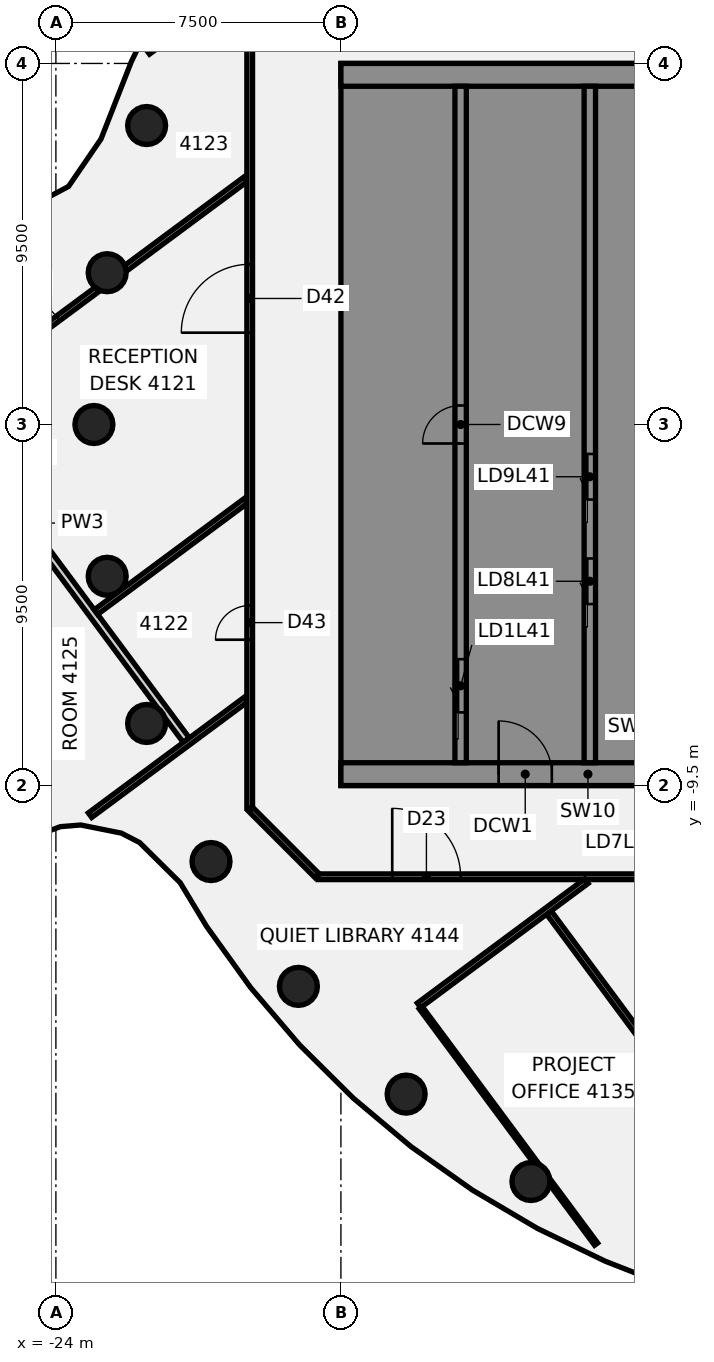
"""IFC4 building model, lengths in metres.
Left out: names, types, materials, properties, quantities, classifications, styles, units other than length and angle.
Written with IfcOpenShell. Run it as: python <this file> out.ifc"""

import sys

from ifc_helpers import new_model, si_unit, direction, frame, frame_2d, origin, origin_2d, place, context, subcontext, project, spatial, polyline, rectangle, circle, outline, extrude, element, fill, save


model = new_model("IFC4")
c1 = context("Model", 3, precision=1e-05, world=origin(), true_north=direction((0.0, 1.0)))
c2 = subcontext(c1, "Body", "Model", "MODEL_VIEW")
j1 = project(units=[si_unit("LENGTHUNIT", "METRE"), si_unit("PLANEANGLEUNIT", "RADIAN")], contexts=[c1])
p1 = place(None, origin())
s1 = spatial("IfcSite", under=j1, at=p1, CompositionType="ELEMENT")
p2 = place(p1, origin())
s2 = spatial("IfcBuilding", under=s1, at=p2, CompositionType="ELEMENT")
p3 = place(p2, frame((0.0, 0.0, 166.75)))
s3 = spatial("IfcBuildingStorey", under=s2, at=p3, CompositionType="ELEMENT", Elevation=166.75)
for number, where, z_axis, x_axis in (
    (1, (-21.613, 7.866, -0.14), (0.0, 0.0, 1.0), (1.0, 0.0, 0.0)),
    (2, (-22.651, 3.994, -0.14), (0.0, 0.0, 1.0), (1.0, 0.0, 0.0)),
    (3, (-23.0, 0.0, -0.14), (0.0, 0.0, 1.0), (1.0, 0.0, 0.0)),
    (4, (-22.651, -3.994, -0.14), (0.0, 0.0, 1.0), (1.0, 0.0, 0.0)),
    (5, (-21.613, -7.866, -0.14), (0.0, 0.0, 1.0), (1.0, 0.0, 0.0)),
    (6, (-19.919, -11.5, -0.14), (0.0, 0.0, 1.0), (1.0, 0.0, 0.0)),
    (7, (-17.619, -14.784, -0.14), (0.0, 0.0, 1.0), (1.0, 0.0, 0.0)),
    (8, (-14.784, -17.619, -0.14), (0.0, 0.0, 1.0), (1.0, 0.0, 0.0)),
    (9, (-11.5, -19.919, -0.14), (0.0, 0.0, 1.0), (1.0, 0.0, 0.0)),
):
    element("IfcColumn", number, at=place(p3, frame(where, z_axis=z_axis, x_axis=x_axis)), inside=s3, PredefinedType="COLUMN", context=c2, shape_type="SweptSolid", body=[
        extrude(circle(Radius=0.5, at=origin_2d()), origin(), (0.0, 0.0, 1.0), 3.75),
    ])
p4 = place(p3, frame((-29.043, 3.116, 0.0), z_axis=(0.0, 0.0, 1.0), x_axis=(0.595824418901, -0.803114725205, 0.0)))
e10 = element("IfcWall", 10, at=p4, inside=s3, PredefinedType="PARTITIONING", context=c2, shape_type="SweptSolid", body=[
    extrude(rectangle(XDim=14.219, YDim=0.2, at=frame_2d((7.11, 0.0))), origin(), (0.0, 0.0, 1.0), 3.01),
])
p5 = place(p4, frame((5.799, 0.0, 0.0)))
e11 = element("IfcOpeningElement", 11, at=p5, cuts=e10, PredefinedType="OPENING", context=c2, shape_type="SweptSolid", body=[
    extrude(rectangle(XDim=1.4, YDim=2.1, at=frame_2d((0.7, 1.05))), frame((0.0, 0.11, 0.0), z_axis=(0.0, -1.0, 0.0), x_axis=(1.0, 0.0, 0.0)), (0.0, 0.0, 1.0), 0.22),
])
p6 = place(p3, frame((-14.4, -15.344, 0.0), z_axis=(0.0, 0.0, 1.0), x_axis=(0.595809139837, -0.803126060396, 0.0)))
e12 = element("IfcWall", 12, at=p6, inside=s3, PredefinedType="PARTITIONING", context=c2, shape_type="SweptSolid", body=[
    extrude(rectangle(XDim=5.108, YDim=0.1, at=frame_2d((2.554, 0.0))), origin(), (0.0, 0.0, 1.0), 3.01),
])
p7 = place(p3, frame((-10.994, -19.935, 0.0), z_axis=(0.0, 0.0, 1.0), x_axis=(0.595779392593, -0.803148127908, 0.0)))
e13 = element("IfcWall", 13, at=p7, inside=s3, PredefinedType="PARTITIONING", context=c2, shape_type="SweptSolid", body=[
    extrude(rectangle(XDim=2.031, YDim=0.1, at=frame_2d((1.016, 0.0))), origin(), (0.0, 0.0, 1.0), 3.01),
])
p8 = place(p3, frame((-11.024, -12.846, 0.0), z_axis=(0.0, 0.0, 1.0), x_axis=(0.595804045693, -0.803129839525, 0.0)))
e14 = element("IfcWall", 14, at=p8, inside=s3, PredefinedType="PARTITIONING", context=c2, shape_type="SweptSolid", body=[
    extrude(rectangle(XDim=11.846, YDim=0.15, at=frame_2d((5.923, 0.0))), origin(), (0.0, 0.0, 1.0), 3.01),
])
p9 = place(p8, frame((6.82, 0.0, 0.0)))
e15 = element("IfcOpeningElement", 15, at=p9, cuts=e14, PredefinedType="OPENING", context=c2, shape_type="SweptSolid", body=[
    extrude(rectangle(XDim=0.9, YDim=2.1, at=frame_2d((0.45, 1.05))), frame((0.0, 0.085, 0.0), z_axis=(0.0, -1.0, 0.0), x_axis=(1.0, 0.0, 0.0)), (0.0, 0.0, 1.0), 0.17),
])
p10 = place(p3, frame((-18.872, -10.128, 0.0), z_axis=(0.0, 0.0, 1.0), x_axis=(0.707106781187, -0.707106781187, 0.0)))
e16 = element("IfcWall", 16, at=p10, inside=s3, PredefinedType="PARTITIONING", context=c2, shape_type="SweptSolid", body=[
    extrude(rectangle(XDim=2.465, YDim=0.15, at=frame_2d((1.232, 0.0))), origin(), (0.0, 0.0, 1.0), 3.01),
])
p11 = place(p3, frame((-17.1, -11.9, 0.0), z_axis=(0.0, 0.0, 1.0), x_axis=(1.0, 0.0, 0.0)))
e17 = element("IfcWall", 17, at=p11, inside=s3, PredefinedType="PARTITIONING", context=c2, shape_type="SweptSolid", body=[
    extrude(rectangle(XDim=34.165, YDim=0.15, at=frame_2d((17.083, 0.0))), origin(), (0.0, 0.0, 1.0), 3.01),
])
p12 = place(p11, frame((9.617, 0.0, 0.0)))
e18 = element("IfcOpeningElement", 18, at=p12, cuts=e17, PredefinedType="OPENING", context=c2, shape_type="SweptSolid", body=[
    extrude(rectangle(XDim=1.8, YDim=2.1, at=frame_2d((0.9, 1.05))), frame((0.0, 0.085, 0.0), z_axis=(0.0, -1.0, 0.0), x_axis=(1.0, 0.0, 0.0)), (0.0, 0.0, 1.0), 0.17),
])
p13 = place(p11, frame((1.95, 0.0, 0.0)))
e19 = element("IfcOpeningElement", 19, at=p13, cuts=e17, PredefinedType="OPENING", context=c2, shape_type="SweptSolid", body=[
    extrude(rectangle(XDim=1.8, YDim=2.1, at=frame_2d((0.9, 1.05))), frame((0.0, 0.085, 0.0), z_axis=(0.0, -1.0, 0.0), x_axis=(1.0, 0.0, 0.0)), (0.0, 0.0, 1.0), 0.17),
])
p14 = place(p11, frame((23.871, 0.0, 0.0)))
e20 = element("IfcOpeningElement", 20, at=p14, cuts=e17, PredefinedType="OPENING", context=c2, shape_type="SweptSolid", body=[
    extrude(rectangle(XDim=1.8, YDim=2.1, at=frame_2d((0.9, 1.05))), frame((0.0, 0.085, 0.0), z_axis=(0.0, -1.0, 0.0), x_axis=(1.0, 0.0, 0.0)), (0.0, 0.0, 1.0), 0.17),
])
p15 = place(p3, frame((-26.998, 0.527, 0.0), z_axis=(0.0, 0.0, 1.0), x_axis=(0.803172828939, 0.595746092605, 0.0)))
e21 = element("IfcWall", 21, at=p15, inside=s3, PredefinedType="PARTITIONING", context=c2, shape_type="SweptSolid", body=[
    extrude(rectangle(XDim=5.088, YDim=0.15, at=frame_2d((2.544, 0.0))), origin(), (0.0, 0.0, 1.0), 3.01),
])
p16 = place(p15, frame((2.0, 0.0, 0.0)))
e22 = element("IfcOpeningElement", 22, at=p16, cuts=e21, PredefinedType="OPENING", context=c2, shape_type="SweptSolid", body=[
    extrude(rectangle(XDim=1.8, YDim=2.1, at=frame_2d((0.9, 1.05))), frame((0.0, 0.085, 0.0), z_axis=(0.0, -1.0, 0.0), x_axis=(1.0, 0.0, 0.0)), (0.0, 0.0, 1.0), 0.17),
])
p17 = place(p3, frame((-22.171, 4.107, 0.0), z_axis=(0.0, 0.0, 1.0), x_axis=(0.803180127116, 0.595736253225, 0.0)))
e23 = element("IfcWall", 23, at=p17, inside=s3, PredefinedType="PARTITIONING", context=c2, shape_type="SweptSolid", body=[
    extrude(rectangle(XDim=3.947, YDim=0.15, at=frame_2d((1.974, 0.0))), origin(), (0.0, 0.0, 1.0), 3.01),
])
p18 = place(p3, frame((-23.102, -10.28, 0.0), z_axis=(0.0, 0.0, 1.0), x_axis=(0.803138615649, 0.595792215502, 0.0)))
e24 = element("IfcWall", 24, at=p18, inside=s3, PredefinedType="PARTITIONING", context=c2, shape_type="SweptSolid", body=[
    extrude(rectangle(XDim=5.107, YDim=0.15, at=frame_2d((2.553, 0.0))), origin(), (0.0, 0.0, 1.0), 3.01),
])
p19 = place(p3, frame((-22.946, -4.935, 0.0), z_axis=(0.0, 0.0, 1.0), x_axis=(0.803137919157, 0.595793154385, 0.0)))
e25 = element("IfcWall", 25, at=p19, inside=s3, PredefinedType="PARTITIONING", context=c2, shape_type="SweptSolid", body=[
    extrude(rectangle(XDim=4.912, YDim=0.15, at=frame_2d((2.456, 0.0))), origin(), (0.0, 0.0, 1.0), 3.01),
])
p20 = place(p3, frame((-21.566, 9.784, 0.0), z_axis=(0.0, 0.0, 1.0), x_axis=(0.803148127908, 0.595779392593, 0.0)))
e26 = element("IfcWall", 26, at=p20, inside=s3, PredefinedType="PARTITIONING", context=c2, shape_type="SweptSolid", body=[
    extrude(rectangle(XDim=2.031, YDim=0.1, at=frame_2d((1.016, 0.0))), origin(), (0.0, 0.0, 1.0), 3.01),
])
p21 = place(p3, frame((-14.445, -15.284, 0.0), z_axis=(0.0, 0.0, 1.0), x_axis=(0.803166728219, 0.595754317385, 0.0)))
e27 = element("IfcWall", 27, at=p21, inside=s3, PredefinedType="PARTITIONING", context=c2, shape_type="SweptSolid", body=[
    extrude(rectangle(XDim=5.485, YDim=0.15, at=frame_2d((2.743, 0.0))), origin(), (0.0, 0.0, 1.0), 3.01),
])
p22 = place(p3, frame((-18.9, -10.1, 0.0), z_axis=(0.0, 0.0, 1.0), x_axis=(0.0, 1.0, 0.0)))
e28 = element("IfcWall", 28, at=p22, inside=s3, PredefinedType="PARTITIONING", context=c2, shape_type="SweptSolid", body=[
    extrude(rectangle(XDim=20.2, YDim=0.15, at=frame_2d((10.1, 0.0))), origin(), (0.0, 0.0, 1.0), 3.01),
])
p23 = place(p22, frame((12.516, 0.0, 0.0)))
e29 = element("IfcOpeningElement", 29, at=p23, cuts=e28, PredefinedType="OPENING", context=c2, shape_type="SweptSolid", body=[
    extrude(rectangle(XDim=1.8, YDim=2.1, at=frame_2d((0.9, 1.05))), frame((0.0, 0.085, 0.0), z_axis=(0.0, -1.0, 0.0), x_axis=(1.0, 0.0, 0.0)), (0.0, 0.0, 1.0), 0.17),
])
p24 = place(p22, frame((4.437, 0.0, 0.0)))
e30 = element("IfcOpeningElement", 30, at=p24, cuts=e28, PredefinedType="OPENING", context=c2, shape_type="SweptSolid", body=[
    extrude(rectangle(XDim=0.9, YDim=2.1, at=frame_2d((0.45, 1.05))), frame((0.0, 0.085, 0.0), z_axis=(0.0, -1.0, 0.0), x_axis=(1.0, 0.0, 0.0)), (0.0, 0.0, 1.0), 0.17),
])
p25 = place(p3, frame((-16.5, -9.2, 0.0), z_axis=(0.0, 0.0, 1.0), x_axis=(1.0, 0.0, 0.0)))
e31 = element("IfcWall", 31, at=p25, inside=s3, PredefinedType="SHEAR", context=c2, shape_type="SweptSolid", body=[
    extrude(rectangle(XDim=13.0, YDim=0.6, at=frame_2d((6.5, 0.0))), origin(), (0.0, 0.0, 1.0), 3.61),
])
p26 = place(p25, frame((4.15, 0.0, 0.0)))
e32 = element("IfcOpeningElement", 32, at=p26, cuts=e31, PredefinedType="OPENING", context=c2, shape_type="SweptSolid", body=[
    extrude(rectangle(XDim=1.4, YDim=2.1, at=frame_2d((0.7, 1.05))), frame((0.0, 0.31, 0.0), z_axis=(0.0, -1.0, 0.0), x_axis=(1.0, 0.0, 0.0)), (0.0, 0.0, 1.0), 0.62),
])
p27 = place(p25, frame((10.125, 0.0, 0.0)))
e33 = element("IfcOpeningElement", 33, at=p27, cuts=e31, PredefinedType="OPENING", context=c2, shape_type="SweptSolid", body=[
    extrude(rectangle(XDim=1.4, YDim=2.1, at=frame_2d((0.7, 1.05))), frame((0.0, 0.31, 0.0), z_axis=(0.0, -1.0, 0.0), x_axis=(1.0, 0.0, 0.0)), (0.0, 0.0, 1.0), 0.62),
])
p28 = place(p3, origin())
e34 = element("IfcWall", 34, at=p28, inside=s3, PredefinedType="SHEAR", context=c2, shape_type="SweptSolid", body=[
    extrude(outline(polyline([(-13.5, -8.125), (-15.9, -8.125), (-15.9, -5.625), (-13.5, -5.625), (-13.5, -5.375), (-15.9, -5.375), (-15.9, 5.375), (-13.5, 5.375), (-13.5, 5.625), (-15.9, 5.625), (-15.9, 8.125), (-13.5, 8.125), (-13.5, 8.9), (-15.9, 8.9), (-16.5, 8.9), (-16.5, -8.9), (-15.9, -8.9), (-13.5, -8.9), (-13.5, -8.125)])), origin(), (0.0, 0.0, 1.0), 3.61),
])
p29 = place(p3, frame((-16.5, 9.2, 0.0), z_axis=(0.0, 0.0, 1.0), x_axis=(1.0, 0.0, 0.0)))
e35 = element("IfcWall", 35, at=p29, inside=s3, PredefinedType="SHEAR", context=c2, shape_type="SweptSolid", body=[
    extrude(rectangle(XDim=13.0, YDim=0.6, at=frame_2d((6.5, 0.0))), origin(), (0.0, 0.0, 1.0), 3.61),
])
p30 = place(p3, origin())
e36 = element("IfcWall", 36, at=p30, inside=s3, PredefinedType="SHEAR", context=c2, shape_type="SweptSolid", body=[
    extrude(outline(polyline([(-9.8, -5.375), (-9.8, -5.625), (-7.5, -5.625), (-7.2, -5.625), (-7.2, 8.9), (-7.5, 8.9), (-9.8, 8.9), (-9.8, 8.125), (-7.5, 8.125), (-7.5, 5.625), (-9.8, 5.625), (-9.8, 5.375), (-7.5, 5.375), (-7.5, 2.875), (-9.8, 2.875), (-9.8, 2.625), (-7.5, 2.625), (-7.5, 0.125), (-9.8, 0.125), (-9.8, -0.125), (-7.5, -0.125), (-7.5, -2.625), (-9.8, -2.625), (-9.8, -2.875), (-7.5, -2.875), (-7.5, -5.375), (-9.8, -5.375)])), origin(), (0.0, 0.0, 1.0), 3.61),
])
p31 = place(p3, origin())
e37 = element("IfcWall", 37, at=p31, inside=s3, PredefinedType="SHEAR", context=c2, shape_type="SweptSolid", body=[
    extrude(outline(polyline([(-7.5, -8.125), (-9.55, -8.125), (-9.55, -5.625), (-9.8, -5.625), (-9.8, -8.125), (-9.8, -8.9), (-7.5, -8.9), (-7.5, -8.125)])), origin(), (0.0, 0.0, 1.0), 3.61),
])
p32 = place(p3, frame((-13.35, -8.9, 0.0), z_axis=(0.0, 0.0, 1.0), x_axis=(0.0, 1.0, 0.0)))
e38 = element("IfcWall", 38, at=p32, inside=s3, PredefinedType="SHEAR", context=c2, shape_type="SweptSolid", body=[
    extrude(rectangle(XDim=17.8, YDim=0.3, at=frame_2d((8.9, 0.0))), origin(), (0.0, 0.0, 1.0), 3.61),
])
p33 = place(p32, frame((1.325, 0.0, 0.0)))
e39 = element("IfcOpeningElement", 39, at=p33, cuts=e38, PredefinedType="OPENING", context=c2, shape_type="SweptSolid", body=[
    extrude(rectangle(XDim=1.4, YDim=2.1, at=frame_2d((0.7, 1.05))), frame((0.0, 0.16, 0.0), z_axis=(0.0, -1.0, 0.0), x_axis=(1.0, 0.0, 0.0)), (0.0, 0.0, 1.0), 0.32),
])
p34 = place(p32, frame((8.4, 0.0, 0.0)))
e40 = element("IfcOpeningElement", 40, at=p34, cuts=e38, PredefinedType="OPENING", context=c2, shape_type="SweptSolid", body=[
    extrude(rectangle(XDim=1.0, YDim=2.1, at=frame_2d((0.5, 1.05))), frame((0.0, 0.16, 0.0), z_axis=(0.0, -1.0, 0.0), x_axis=(1.0, 0.0, 0.0)), (0.0, 0.0, 1.0), 0.32),
])
p35 = place(p3, frame((-9.95, -8.9, 0.0), z_axis=(0.0, 0.0, 1.0), x_axis=(0.0, 1.0, 0.0)))
e41 = element("IfcWall", 41, at=p35, inside=s3, PredefinedType="SHEAR", context=c2, shape_type="SweptSolid", body=[
    extrude(rectangle(XDim=17.8, YDim=0.3, at=frame_2d((8.9, 0.0))), origin(), (0.0, 0.0, 1.0), 3.61),
])
p36 = place(p35, frame((4.175, 0.0, 0.0)))
e42 = element("IfcOpeningElement", 42, at=p36, cuts=e41, PredefinedType="OPENING", context=c2, shape_type="SweptSolid", body=[
    extrude(rectangle(XDim=1.2, YDim=2.1, at=frame_2d((0.6, 1.05))), frame((0.0, 0.16, 0.0), z_axis=(0.0, -1.0, 0.0), x_axis=(1.0, 0.0, 0.0)), (0.0, 0.0, 1.0), 0.32),
])
p37 = place(p35, frame((6.925, 0.0, 0.0)))
e43 = element("IfcOpeningElement", 43, at=p37, cuts=e41, PredefinedType="OPENING", context=c2, shape_type="SweptSolid", body=[
    extrude(rectangle(XDim=1.2, YDim=2.1, at=frame_2d((0.6, 1.05))), frame((0.0, 0.16, 0.0), z_axis=(0.0, -1.0, 0.0), x_axis=(1.0, 0.0, 0.0)), (0.0, 0.0, 1.0), 0.32),
])
p38 = place(p13, frame((1.8, 0.0, 0.0), z_axis=(0.0, 0.0, 1.0), x_axis=(-1.0, 0.0, 0.0)))
e44 = element("IfcDoor", 44, at=p38, inside=s3, OperationType="DOUBLE_DOOR_SINGLE_SWING", PredefinedType="DOOR", context=c2, shape_type="SweptSolid", body=[
    extrude(rectangle(XDim=1.8, YDim=2.1, at=frame_2d((0.9, 1.05))), frame((0.0, 0.025, 0.0), z_axis=(0.0, -1.0, 0.0), x_axis=(1.0, 0.0, 0.0)), (0.0, 0.0, 1.0), 0.05),
])
fill(e19, e44)
p39 = place(p16, origin())
e45 = element("IfcDoor", 45, at=p39, inside=s3, OperationType="DOUBLE_DOOR_SINGLE_SWING", PredefinedType="DOOR", context=c2, shape_type="SweptSolid", body=[
    extrude(rectangle(XDim=1.8, YDim=2.1, at=frame_2d((0.9, 1.05))), frame((0.0, 0.025, 0.0), z_axis=(0.0, -1.0, 0.0), x_axis=(1.0, 0.0, 0.0)), (0.0, 0.0, 1.0), 0.05),
])
fill(e22, e45)
p40 = place(p23, frame((1.8, 0.0, 0.0), z_axis=(0.0, 0.0, 1.0), x_axis=(-1.0, 0.0, 0.0)))
e46 = element("IfcDoor", 46, at=p40, inside=s3, OperationType="DOUBLE_DOOR_SINGLE_SWING", PredefinedType="DOOR", context=c2, shape_type="SweptSolid", body=[
    extrude(rectangle(XDim=1.8, YDim=2.1, at=frame_2d((0.9, 1.05))), frame((0.0, 0.025, 0.0), z_axis=(0.0, -1.0, 0.0), x_axis=(1.0, 0.0, 0.0)), (0.0, 0.0, 1.0), 0.05),
])
fill(e29, e46)
p41 = place(p24, origin())
e47 = element("IfcDoor", 47, at=p41, inside=s3, OperationType="SINGLE_SWING_RIGHT", PredefinedType="DOOR", context=c2, shape_type="SweptSolid", body=[
    extrude(rectangle(XDim=0.9, YDim=2.1, at=frame_2d((0.45, 1.05))), frame((0.0, 0.025, 0.0), z_axis=(0.0, -1.0, 0.0), x_axis=(1.0, 0.0, 0.0)), (0.0, 0.0, 1.0), 0.05),
])
fill(e30, e47)
p42 = place(p26, origin())
e48 = element("IfcDoor", 48, at=p42, inside=s3, OperationType="SINGLE_SWING_LEFT", PredefinedType="DOOR", context=c2, shape_type="SweptSolid", body=[
    extrude(rectangle(XDim=1.4, YDim=2.1, at=frame_2d((0.7, 1.05))), frame((0.0, 0.025, 0.0), z_axis=(0.0, -1.0, 0.0), x_axis=(1.0, 0.0, 0.0)), (0.0, 0.0, 1.0), 0.05),
])
fill(e32, e48)
p43 = place(p33, origin())
e49 = element("IfcDoor", 49, at=p43, inside=s3, OperationType="SLIDING_TO_LEFT", PredefinedType="DOOR", context=c2, shape_type="SweptSolid", body=[
    extrude(rectangle(XDim=1.4, YDim=2.1, at=frame_2d((0.7, 1.05))), frame((0.0, 0.025, 0.0), z_axis=(0.0, -1.0, 0.0), x_axis=(1.0, 0.0, 0.0)), (0.0, 0.0, 1.0), 0.05),
])
fill(e39, e49)
p44 = place(p36, origin())
e50 = element("IfcDoor", 50, at=p44, inside=s3, OperationType="SLIDING_TO_LEFT", PredefinedType="DOOR", context=c2, shape_type="SweptSolid", body=[
    extrude(rectangle(XDim=1.2, YDim=2.1, at=frame_2d((0.6, 1.05))), frame((0.0, 0.025, 0.0), z_axis=(0.0, -1.0, 0.0), x_axis=(1.0, 0.0, 0.0)), (0.0, 0.0, 1.0), 0.05),
])
fill(e42, e50)
p45 = place(p37, origin())
e51 = element("IfcDoor", 51, at=p45, inside=s3, OperationType="SLIDING_TO_LEFT", PredefinedType="DOOR", context=c2, shape_type="SweptSolid", body=[
    extrude(rectangle(XDim=1.2, YDim=2.1, at=frame_2d((0.6, 1.05))), frame((0.0, 0.025, 0.0), z_axis=(0.0, -1.0, 0.0), x_axis=(1.0, 0.0, 0.0)), (0.0, 0.0, 1.0), 0.05),
])
fill(e43, e51)
p46 = place(p34, origin())
e52 = element("IfcDoor", 52, at=p46, inside=s3, OperationType="SINGLE_SWING_LEFT", PredefinedType="DOOR", context=c2, shape_type="SweptSolid", body=[
    extrude(rectangle(XDim=1.0, YDim=2.1, at=frame_2d((0.5, 1.05))), frame((0.0, 0.025, 0.0), z_axis=(0.0, -1.0, 0.0), x_axis=(1.0, 0.0, 0.0)), (0.0, 0.0, 1.0), 0.05),
])
fill(e40, e52)
save(model, sys.argv[1])
